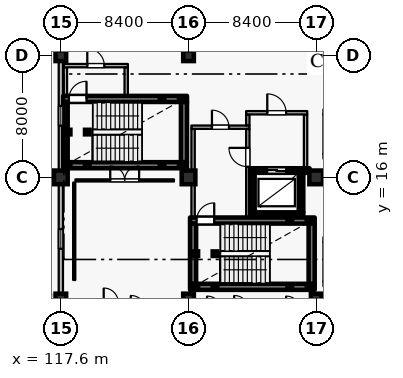
"""IFC4 building model, lengths in metres.
Left out: names, types, materials, properties, quantities, classifications, styles, units other than length and angle.
Written with IfcOpenShell. Run it as: python <this file> out.ifc"""

import sys

from ifc_helpers import new_model, si_unit, direction, frame, frame_2d, origin, origin_2d, place, context, subcontext, project, spatial, rectangle, hollow_rectangle, extrude, element, fill, save


model = new_model("IFC4")
c1 = context("Model", 3, precision=1e-05, world=origin(), true_north=direction((0.0, 1.0)))
c2 = subcontext(c1, "Body", "Model", "MODEL_VIEW")
j1 = project(units=[si_unit("LENGTHUNIT", "METRE"), si_unit("PLANEANGLEUNIT", "RADIAN")], contexts=[c1])
p1 = place(None, origin())
s1 = spatial("IfcSite", under=j1, at=p1, CompositionType="ELEMENT")
p2 = place(p1, origin())
s2 = spatial("IfcBuilding", under=s1, at=p2, CompositionType="ELEMENT")
p3 = place(p2, frame((0.0, 0.0, 21.0)))
s3 = spatial("IfcBuildingStorey", under=s2, at=p3, CompositionType="ELEMENT", Elevation=21.0)
for number, where, z_axis, x_axis in (
    (1, (117.6, 16.0, 0.0), (0.0, 0.0, 1.0), (1.0, 0.0, 0.0)),
    (2, (126.0, 16.0, 0.0), (0.0, 0.0, 1.0), (1.0, 0.0, 0.0)),
    (3, (134.4, 16.0, 0.0), (0.0, 0.0, 1.0), (1.0, 0.0, 0.0)),
):
    element("IfcColumn", number, at=place(p3, frame(where, z_axis=z_axis, x_axis=x_axis)), inside=s3, PredefinedType="COLUMN", context=c2, shape_type="SweptSolid", body=[
        extrude(rectangle(XDim=0.9, YDim=0.9, at=origin_2d()), origin(), (0.0, 0.0, 1.0), 4.2),
    ])
for number, where, z_axis, x_axis in (
    (4, (117.6, 8.0, 0.0), (0.0, 0.0, 1.0), (1.0, 0.0, 0.0)),
    (5, (117.6, 24.0, 0.0), (0.0, 0.0, 1.0), (1.0, 0.0, 0.0)),
    (6, (126.0, 8.0, 0.0), (0.0, 0.0, 1.0), (1.0, 0.0, 0.0)),
    (7, (126.0, 24.0, 0.0), (0.0, 0.0, 1.0), (1.0, 0.0, 0.0)),
    (8, (134.4, 8.0, 0.0), (0.0, 0.0, 1.0), (1.0, 0.0, 0.0)),
    (9, (134.4, 24.0, 0.0), (0.0, 0.0, 1.0), (1.0, 0.0, 0.0)),
):
    element("IfcColumn", number, at=place(p3, frame(where, z_axis=z_axis, x_axis=x_axis)), inside=s3, PredefinedType="COLUMN", context=c2, shape_type="SweptSolid", body=[
        extrude(rectangle(XDim=0.7, YDim=0.7, at=origin_2d()), origin(), (0.0, 0.0, 1.0), 4.2),
    ])
p4 = place(p3, frame((117.6, 8.35, 0.0), z_axis=(0.0, 0.0, 1.0), x_axis=(0.0, 1.0, 0.0)))
e10 = element("IfcWall", 10, at=p4, inside=s3, PredefinedType="SOLIDWALL", context=c2, shape_type="SweptSolid", body=[
    extrude(rectangle(XDim=7.2, YDim=0.28, at=frame_2d((3.6, 0.0))), origin(), (0.0, 0.0, 1.0), 3.3),
])
p5 = place(p4, frame((2.95, 0.0, 0.75)))
e11 = element("IfcOpeningElement", 11, at=p5, cuts=e10, PredefinedType="OPENING", context=c2, shape_type="SweptSolid", body=[
    extrude(rectangle(XDim=1.3, YDim=1.65, at=frame_2d((0.65, 0.825))), frame((0.0, 0.15, 0.0), z_axis=(0.0, -1.0, 0.0), x_axis=(1.0, 0.0, 0.0)), (0.0, 0.0, 1.0), 0.3),
])
p6 = place(p3, frame((117.6, 16.45, 0.0), z_axis=(0.0, 0.0, 1.0), x_axis=(0.0, 1.0, 0.0)))
e12 = element("IfcWall", 12, at=p6, inside=s3, PredefinedType="SOLIDWALL", context=c2, shape_type="SweptSolid", body=[
    extrude(rectangle(XDim=7.2, YDim=0.28, at=frame_2d((3.6, 0.0))), origin(), (0.0, 0.0, 1.0), 3.3),
])
p7 = place(p6, frame((2.95, 0.0, 0.75)))
e13 = element("IfcOpeningElement", 13, at=p7, cuts=e12, PredefinedType="OPENING", context=c2, shape_type="SweptSolid", body=[
    extrude(rectangle(XDim=1.3, YDim=1.65, at=frame_2d((0.65, 0.825))), frame((0.0, 0.15, 0.0), z_axis=(0.0, -1.0, 0.0), x_axis=(1.0, 0.0, 0.0)), (0.0, 0.0, 1.0), 0.3),
])
p8 = place(p3, frame((130.05, 13.55, 0.0), z_axis=(0.0, 0.0, 1.0), x_axis=(1.0, 0.0, 0.0)))
e14 = element("IfcWall", 14, at=p8, inside=s3, PredefinedType="SHEAR", context=c2, shape_type="SweptSolid", body=[
    extrude(rectangle(XDim=3.5, YDim=0.3, at=frame_2d((1.75, 0.0))), origin(), (0.0, 0.0, 1.0), 3.965),
])
p9 = place(p3, frame((133.4, 13.705, 0.0), z_axis=(0.0, 0.0, 1.0), x_axis=(0.0, 1.0, 0.0)))
e15 = element("IfcWall", 15, at=p9, inside=s3, PredefinedType="SHEAR", context=c2, shape_type="SweptSolid", body=[
    extrude(rectangle(XDim=2.59, YDim=0.3, at=frame_2d((1.295, 0.0))), origin(), (0.0, 0.0, 1.0), 3.965),
])
p10 = place(p3, frame((133.96, 16.45, 0.0), z_axis=(0.0, 0.0, 1.0), x_axis=(-1.0, 0.0, 0.0)))
e16 = element("IfcWall", 16, at=p10, inside=s3, PredefinedType="SHEAR", context=c2, shape_type="SweptSolid", body=[
    extrude(rectangle(XDim=3.91, YDim=0.3, at=frame_2d((1.955, 0.0))), origin(), (0.0, 0.0, 1.0), 3.965),
])
p11 = place(p10, frame((1.535, 0.0, 0.0)))
e17 = element("IfcOpeningElement", 17, at=p11, cuts=e16, PredefinedType="OPENING", context=c2, shape_type="SweptSolid", body=[
    extrude(rectangle(XDim=1.25, YDim=2.25, at=frame_2d((0.625, 1.125))), frame((0.0, 0.16, 0.0), z_axis=(0.0, -1.0, 0.0), x_axis=(1.0, 0.0, 0.0)), (0.0, 0.0, 1.0), 0.32),
])
p12 = place(p3, frame((130.2, 16.295, 0.0), z_axis=(0.0, 0.0, 1.0), x_axis=(0.0, -1.0, 0.0)))
e18 = element("IfcWall", 18, at=p12, inside=s3, PredefinedType="SHEAR", context=c2, shape_type="SweptSolid", body=[
    extrude(rectangle(XDim=2.59, YDim=0.3, at=frame_2d((1.295, 0.0))), origin(), (0.0, 0.0, 1.0), 3.965),
])
p13 = place(p3, frame((126.1, 8.8, 0.0), z_axis=(0.0, 0.0, 1.0), x_axis=(1.0, 0.0, 0.0)))
e19 = element("IfcWall", 19, at=p13, inside=s3, PredefinedType="SHEAR", context=c2, shape_type="SweptSolid", body=[
    extrude(rectangle(XDim=8.2, YDim=0.4, at=frame_2d((4.1, 0.0))), origin(), (0.0, 0.0, 1.0), 3.965),
])
p14 = place(p3, frame((134.1, 9.005, 0.0), z_axis=(0.0, 0.0, 1.0), x_axis=(0.0, 1.0, 0.0)))
e20 = element("IfcWall", 20, at=p14, inside=s3, PredefinedType="SHEAR", context=c2, shape_type="SweptSolid", body=[
    extrude(rectangle(XDim=3.95, YDim=0.4, at=frame_2d((1.975, 0.0))), origin(), (0.0, 0.0, 1.0), 3.965),
])
p15 = place(p3, frame((126.1, 13.16, 0.0), z_axis=(0.0, 0.0, 1.0), x_axis=(1.0, 0.0, 0.0)))
e21 = element("IfcWall", 21, at=p15, inside=s3, PredefinedType="SHEAR", context=c2, shape_type="SweptSolid", body=[
    extrude(rectangle(XDim=8.2, YDim=0.4, at=frame_2d((4.1, 0.0))), origin(), (0.0, 0.0, 1.0), 3.965),
])
p16 = place(p15, frame((0.43, 0.0, 0.0)))
e22 = element("IfcOpeningElement", 22, at=p16, cuts=e21, PredefinedType="OPENING", context=c2, shape_type="SweptSolid", body=[
    extrude(rectangle(XDim=1.16, YDim=2.2, at=frame_2d((0.58, 1.1))), frame((0.0, 0.21, 0.0), z_axis=(0.0, -1.0, 0.0), x_axis=(1.0, 0.0, 0.0)), (0.0, 0.0, 1.0), 0.42),
])
p17 = place(p3, frame((126.3, 9.005, 0.0), z_axis=(0.0, 0.0, 1.0), x_axis=(0.0, 1.0, 0.0)))
e23 = element("IfcWall", 23, at=p17, inside=s3, PredefinedType="SHEAR", context=c2, shape_type="SweptSolid", body=[
    extrude(rectangle(XDim=3.95, YDim=0.4, at=frame_2d((1.975, 0.0))), origin(), (0.0, 0.0, 1.0), 3.965),
])
p18 = place(p3, frame((126.3, 13.365, 0.0), z_axis=(0.0, 0.0, 1.0), x_axis=(0.0, 1.0, 0.0)))
e24 = element("IfcWall", 24, at=p18, inside=s3, PredefinedType="PARTITIONING", context=c2, shape_type="SweptSolid", body=[
    extrude(rectangle(XDim=5.82, YDim=0.22, at=frame_2d((2.91, 0.0))), origin(), (0.0, 0.0, 1.0), 3.965),
])
p19 = place(p3, frame((126.19, 19.3, 0.0), z_axis=(0.0, 0.0, 1.0), x_axis=(1.0, 0.0, 0.0)))
e25 = element("IfcWall", 25, at=p19, inside=s3, PredefinedType="PARTITIONING", context=c2, shape_type="SweptSolid", body=[
    extrude(rectangle(XDim=3.82, YDim=0.22, at=frame_2d((1.91, 0.0))), origin(), (0.0, 0.0, 1.0), 3.965),
])
p20 = place(p19, frame((1.35, 0.0, 0.0)))
e26 = element("IfcOpeningElement", 26, at=p20, cuts=e25, PredefinedType="OPENING", context=c2, shape_type="SweptSolid", body=[
    extrude(rectangle(XDim=1.12, YDim=2.2, at=frame_2d((0.56, 1.1))), frame((0.0, 0.12, 0.0), z_axis=(0.0, -1.0, 0.0), x_axis=(1.0, 0.0, 0.0)), (0.0, 0.0, 1.0), 0.24),
])
p21 = place(p3, frame((129.9, 13.365, 0.0), z_axis=(0.0, 0.0, 1.0), x_axis=(0.0, 1.0, 0.0)))
e27 = element("IfcWall", 27, at=p21, inside=s3, PredefinedType="PARTITIONING", context=c2, shape_type="SweptSolid", body=[
    extrude(rectangle(XDim=5.82, YDim=0.22, at=frame_2d((2.91, 0.0))), origin(), (0.0, 0.0, 1.0), 3.965),
])
p22 = place(p21, frame((3.335, 0.0, 0.0)))
e28 = element("IfcOpeningElement", 28, at=p22, cuts=e27, PredefinedType="OPENING", context=c2, shape_type="SweptSolid", body=[
    extrude(rectangle(XDim=1.24, YDim=2.2, at=frame_2d((0.62, 1.1))), frame((0.0, 0.12, 0.0), z_axis=(0.0, -1.0, 0.0), x_axis=(1.0, 0.0, 0.0)), (0.0, 0.0, 1.0), 0.24),
])
p23 = place(p3, frame((129.9, 19.415, 0.0), z_axis=(0.0, 0.0, 1.0), x_axis=(0.0, 1.0, 0.0)))
e29 = element("IfcWall", 29, at=p23, inside=s3, PredefinedType="PARTITIONING", context=c2, shape_type="SweptSolid", body=[
    extrude(rectangle(XDim=0.72, YDim=0.22, at=frame_2d((0.36, 0.0))), origin(), (0.0, 0.0, 1.0), 3.965),
])
p24 = place(p3, frame((133.7, 16.605, 0.0), z_axis=(0.0, 0.0, 1.0), x_axis=(0.0, 1.0, 0.0)))
e30 = element("IfcWall", 30, at=p24, inside=s3, PredefinedType="PARTITIONING", context=c2, shape_type="SweptSolid", body=[
    extrude(rectangle(XDim=3.53, YDim=0.22, at=frame_2d((1.765, 0.0))), origin(), (0.0, 0.0, 1.0), 3.965),
])
p25 = place(p3, frame((129.79, 20.25, 0.0), z_axis=(0.0, 0.0, 1.0), x_axis=(1.0, 0.0, 0.0)))
e31 = element("IfcWall", 31, at=p25, inside=s3, PredefinedType="PARTITIONING", context=c2, shape_type="SweptSolid", body=[
    extrude(rectangle(XDim=4.02, YDim=0.22, at=frame_2d((2.01, 0.0))), origin(), (0.0, 0.0, 1.0), 3.965),
])
p26 = place(p25, frame((1.39, 0.0, 0.0)))
e32 = element("IfcOpeningElement", 32, at=p26, cuts=e31, PredefinedType="OPENING", context=c2, shape_type="SweptSolid", body=[
    extrude(rectangle(XDim=1.24, YDim=2.2, at=frame_2d((0.62, 1.1))), frame((0.0, 0.12, 0.0), z_axis=(0.0, -1.0, 0.0), x_axis=(1.0, 0.0, 0.0)), (0.0, 0.0, 1.0), 0.24),
])
for number, where, z_axis, x_axis in (
    (33, (126.48, 8.8, 0.0), (0.0, 0.0, 1.0), (1.0, 0.0, 0.0)),
    (34, (126.48, 10.98, 0.0), (0.0, 0.0, 1.0), (1.0, 0.0, 0.0)),
    (35, (127.74, 8.8, 0.0), (0.0, 0.0, 1.0), (1.0, 0.0, 0.0)),
    (36, (127.74, 10.98, 0.0), (0.0, 0.0, 1.0), (1.0, 0.0, 0.0)),
):
    element("IfcColumn", number, at=place(p3, frame(where, z_axis=z_axis, x_axis=x_axis)), inside=s3, PredefinedType="COLUMN", context=c2, shape_type="SweptSolid", body=[
        extrude(hollow_rectangle(XDim=0.3, YDim=0.3, WallThickness=0.012, at=origin_2d()), origin(), (0.0, 0.0, 1.0), 4.02),
    ])
for number, where, z_axis, x_axis in (
    (37, (132.66, 8.8, -2.4), (0.0, 0.0, 1.0), (1.0, 0.0, 0.0)),
    (38, (132.66, 13.16, -2.4), (0.0, 0.0, 1.0), (1.0, 0.0, 0.0)),
    (39, (133.92, 8.8, -2.4), (0.0, 0.0, 1.0), (1.0, 0.0, 0.0)),
    (40, (133.92, 13.16, -2.4), (0.0, 0.0, 1.0), (1.0, 0.0, 0.0)),
):
    element("IfcColumn", number, at=place(p3, frame(where, z_axis=z_axis, x_axis=x_axis)), inside=s3, PredefinedType="COLUMN", context=c2, shape_type="SweptSolid", body=[
        extrude(hollow_rectangle(XDim=0.3, YDim=0.3, WallThickness=0.012, at=origin_2d()), origin(), (0.0, 0.0, 1.0), 4.32),
    ])
p27 = place(p3, frame((117.75, 16.8, 0.0), z_axis=(0.0, 0.0, 1.0), x_axis=(1.0, 0.0, 0.0)))
e41 = element("IfcWall", 41, at=p27, inside=s3, PredefinedType="SHEAR", context=c2, shape_type="SweptSolid", body=[
    extrude(rectangle(XDim=8.15, YDim=0.4, at=frame_2d((4.075, 0.0))), origin(), (0.0, 0.0, 1.0), 3.965),
])
p28 = place(p3, frame((125.7, 17.005, 0.0), z_axis=(0.0, 0.0, 1.0), x_axis=(0.0, 1.0, 0.0)))
e42 = element("IfcWall", 42, at=p28, inside=s3, PredefinedType="SHEAR", context=c2, shape_type="SweptSolid", body=[
    extrude(rectangle(XDim=3.95, YDim=0.4, at=frame_2d((1.975, 0.0))), origin(), (0.0, 0.0, 1.0), 3.965),
])
p29 = place(p3, frame((117.75, 21.16, 0.0), z_axis=(0.0, 0.0, 1.0), x_axis=(1.0, 0.0, 0.0)))
e43 = element("IfcWall", 43, at=p29, inside=s3, PredefinedType="SHEAR", context=c2, shape_type="SweptSolid", body=[
    extrude(rectangle(XDim=8.15, YDim=0.4, at=frame_2d((4.075, 0.0))), origin(), (0.0, 0.0, 1.0), 3.965),
])
p30 = place(p29, frame((0.38, 0.0, 0.0)))
e44 = element("IfcOpeningElement", 44, at=p30, cuts=e43, PredefinedType="OPENING", context=c2, shape_type="SweptSolid", body=[
    extrude(rectangle(XDim=1.16, YDim=2.2, at=frame_2d((0.58, 1.1))), frame((0.0, 0.21, 0.0), z_axis=(0.0, -1.0, 0.0), x_axis=(1.0, 0.0, 0.0)), (0.0, 0.0, 1.0), 0.42),
])
p31 = place(p3, frame((117.9, 17.005, 0.0), z_axis=(0.0, 0.0, 1.0), x_axis=(0.0, 1.0, 0.0)))
e45 = element("IfcWall", 45, at=p31, inside=s3, PredefinedType="SHEAR", context=c2, shape_type="SweptSolid", body=[
    extrude(rectangle(XDim=3.95, YDim=0.3, at=frame_2d((1.975, 0.0))), origin(), (0.0, 0.0, 1.0), 3.965),
])
p32 = place(p3, frame((117.9, 21.365, 0.0), z_axis=(0.0, 0.0, 1.0), x_axis=(0.0, 1.0, 0.0)))
e46 = element("IfcWall", 46, at=p32, inside=s3, PredefinedType="PARTITIONING", context=c2, shape_type="SweptSolid", body=[
    extrude(rectangle(XDim=1.87, YDim=0.22, at=frame_2d((0.935, 0.0))), origin(), (0.0, 0.0, 1.0), 3.965),
])
p33 = place(p3, frame((117.79, 23.35, 0.0), z_axis=(0.0, 0.0, 1.0), x_axis=(1.0, 0.0, 0.0)))
e47 = element("IfcWall", 47, at=p33, inside=s3, PredefinedType="PARTITIONING", context=c2, shape_type="SweptSolid", body=[
    extrude(rectangle(XDim=4.22, YDim=0.22, at=frame_2d((2.11, 0.0))), origin(), (0.0, 0.0, 1.0), 3.965),
])
p34 = place(p33, frame((1.55, 0.0, 0.0)))
e48 = element("IfcOpeningElement", 48, at=p34, cuts=e47, PredefinedType="OPENING", context=c2, shape_type="SweptSolid", body=[
    extrude(rectangle(XDim=1.12, YDim=2.2, at=frame_2d((0.56, 1.1))), frame((0.0, 0.12, 0.0), z_axis=(0.0, -1.0, 0.0), x_axis=(1.0, 0.0, 0.0)), (0.0, 0.0, 1.0), 0.24),
])
p35 = place(p3, frame((121.9, 21.365, 0.0), z_axis=(0.0, 0.0, 1.0), x_axis=(0.0, 1.0, 0.0)))
e49 = element("IfcWall", 49, at=p35, inside=s3, PredefinedType="PARTITIONING", context=c2, shape_type="SweptSolid", body=[
    extrude(rectangle(XDim=1.87, YDim=0.22, at=frame_2d((0.935, 0.0))), origin(), (0.0, 0.0, 1.0), 3.965),
])
for number, where, z_axis, x_axis in (
    (50, (118.08, 16.8, 0.0), (0.0, 0.0, 1.0), (1.0, 0.0, 0.0)),
    (51, (118.08, 18.98, 0.0), (0.0, 0.0, 1.0), (1.0, 0.0, 0.0)),
    (52, (119.34, 16.8, 0.0), (0.0, 0.0, 1.0), (1.0, 0.0, 0.0)),
    (53, (119.34, 18.98, 0.0), (0.0, 0.0, 1.0), (1.0, 0.0, 0.0)),
):
    element("IfcColumn", number, at=place(p3, frame(where, z_axis=z_axis, x_axis=x_axis)), inside=s3, PredefinedType="COLUMN", context=c2, shape_type="SweptSolid", body=[
        extrude(hollow_rectangle(XDim=0.3, YDim=0.3, WallThickness=0.012, at=origin_2d()), origin(), (0.0, 0.0, 1.0), 4.02),
    ])
for number, where, z_axis, x_axis in (
    (54, (124.26, 16.8, -2.4), (0.0, 0.0, 1.0), (1.0, 0.0, 0.0)),
    (55, (124.26, 21.16, -2.4), (0.0, 0.0, 1.0), (1.0, 0.0, 0.0)),
    (56, (125.52, 16.8, -2.4), (0.0, 0.0, 1.0), (1.0, 0.0, 0.0)),
    (57, (125.52, 21.16, -2.4), (0.0, 0.0, 1.0), (1.0, 0.0, 0.0)),
):
    element("IfcColumn", number, at=place(p3, frame(where, z_axis=z_axis, x_axis=x_axis)), inside=s3, PredefinedType="COLUMN", context=c2, shape_type="SweptSolid", body=[
        extrude(hollow_rectangle(XDim=0.3, YDim=0.3, WallThickness=0.012, at=origin_2d()), origin(), (0.0, 0.0, 1.0), 4.32),
    ])
p36 = place(p3, frame((118.56, 15.8, 0.0), z_axis=(0.0, 0.0, 1.0), x_axis=(1.0, 0.0, 0.0)))
e58 = element("IfcWall", 58, at=p36, inside=s3, PredefinedType="PARTITIONING", context=c2, shape_type="SweptSolid", body=[
    extrude(rectangle(XDim=6.48, YDim=0.14, at=frame_2d((3.24, 0.0))), origin(), (0.0, 0.0, 1.0), 3.965),
])
p37 = place(p36, frame((2.29, 0.0, 0.0)))
e59 = element("IfcOpeningElement", 59, at=p37, cuts=e58, PredefinedType="OPENING", context=c2, shape_type="SweptSolid", body=[
    extrude(rectangle(XDim=1.9, YDim=2.4, at=frame_2d((0.95, 1.2))), frame((0.0, 0.08, 0.0), z_axis=(0.0, -1.0, 0.0), x_axis=(1.0, 0.0, 0.0)), (0.0, 0.0, 1.0), 0.16),
])
p38 = place(p3, frame((118.48, 9.25, 0.0), z_axis=(0.0, 0.0, 1.0), x_axis=(0.0, 1.0, 0.0)))
e60 = element("IfcWall", 60, at=p38, inside=s3, PredefinedType="PARTITIONING", context=c2, shape_type="SweptSolid", body=[
    extrude(rectangle(XDim=6.41, YDim=0.14, at=frame_2d((3.205, 0.0))), origin(), (0.0, 0.0, 1.0), 3.965),
])
p39 = place(p5, origin())
e61 = element("IfcWindow", 61, at=p39, inside=s3, PartitioningType="SINGLE_PANEL", PredefinedType="WINDOW", context=c2, shape_type="SweptSolid", body=[
    extrude(rectangle(XDim=1.3, YDim=1.65, at=frame_2d((0.65, 0.825))), frame((0.0, 0.03, 0.0), z_axis=(0.0, -1.0, 0.0), x_axis=(1.0, 0.0, 0.0)), (0.0, 0.0, 1.0), 0.06),
])
fill(e11, e61)
p40 = place(p7, origin())
e62 = element("IfcWindow", 62, at=p40, inside=s3, PartitioningType="SINGLE_PANEL", PredefinedType="WINDOW", context=c2, shape_type="SweptSolid", body=[
    extrude(rectangle(XDim=1.3, YDim=1.65, at=frame_2d((0.65, 0.825))), frame((0.0, 0.03, 0.0), z_axis=(0.0, -1.0, 0.0), x_axis=(1.0, 0.0, 0.0)), (0.0, 0.0, 1.0), 0.06),
])
fill(e13, e62)
p41 = place(p11, origin())
e63 = element("IfcDoor", 63, at=p41, inside=s3, OperationType="DOUBLE_DOOR_SLIDING", PredefinedType="DOOR", context=c2, shape_type="SweptSolid", body=[
    extrude(rectangle(XDim=1.25, YDim=2.25, at=frame_2d((0.625, 1.125))), frame((0.0, 0.025, 0.0), z_axis=(0.0, -1.0, 0.0), x_axis=(1.0, 0.0, 0.0)), (0.0, 0.0, 1.0), 0.05),
])
fill(e17, e63)
p42 = place(p16, origin())
e64 = element("IfcDoor", 64, at=p42, inside=s3, OperationType="SINGLE_SWING_RIGHT", PredefinedType="DOOR", context=c2, shape_type="SweptSolid", body=[
    extrude(rectangle(XDim=1.16, YDim=2.2, at=frame_2d((0.58, 1.1))), frame((0.0, 0.025, 0.0), z_axis=(0.0, -1.0, 0.0), x_axis=(1.0, 0.0, 0.0)), (0.0, 0.0, 1.0), 0.05),
])
fill(e22, e64)
p43 = place(p20, origin())
e65 = element("IfcDoor", 65, at=p43, inside=s3, OperationType="SINGLE_SWING_LEFT", PredefinedType="DOOR", context=c2, shape_type="SweptSolid", body=[
    extrude(rectangle(XDim=1.12, YDim=2.2, at=frame_2d((0.56, 1.1))), frame((0.0, 0.025, 0.0), z_axis=(0.0, -1.0, 0.0), x_axis=(1.0, 0.0, 0.0)), (0.0, 0.0, 1.0), 0.05),
])
fill(e26, e65)
p44 = place(p22, origin())
e66 = element("IfcDoor", 66, at=p44, inside=s3, OperationType="SINGLE_SWING_RIGHT", PredefinedType="DOOR", context=c2, shape_type="SweptSolid", body=[
    extrude(rectangle(XDim=1.24, YDim=2.2, at=frame_2d((0.62, 1.1))), frame((0.0, 0.025, 0.0), z_axis=(0.0, -1.0, 0.0), x_axis=(1.0, 0.0, 0.0)), (0.0, 0.0, 1.0), 0.05),
])
fill(e28, e66)
p45 = place(p26, origin())
e67 = element("IfcDoor", 67, at=p45, inside=s3, OperationType="SINGLE_SWING_LEFT", PredefinedType="DOOR", context=c2, shape_type="SweptSolid", body=[
    extrude(rectangle(XDim=1.24, YDim=2.2, at=frame_2d((0.62, 1.1))), frame((0.0, 0.025, 0.0), z_axis=(0.0, -1.0, 0.0), x_axis=(1.0, 0.0, 0.0)), (0.0, 0.0, 1.0), 0.05),
])
fill(e32, e67)
p46 = place(p30, origin())
e68 = element("IfcDoor", 68, at=p46, inside=s3, OperationType="SINGLE_SWING_RIGHT", PredefinedType="DOOR", context=c2, shape_type="SweptSolid", body=[
    extrude(rectangle(XDim=1.16, YDim=2.2, at=frame_2d((0.58, 1.1))), frame((0.0, 0.025, 0.0), z_axis=(0.0, -1.0, 0.0), x_axis=(1.0, 0.0, 0.0)), (0.0, 0.0, 1.0), 0.05),
])
fill(e44, e68)
p47 = place(p34, origin())
e69 = element("IfcDoor", 69, at=p47, inside=s3, OperationType="SINGLE_SWING_LEFT", PredefinedType="DOOR", context=c2, shape_type="SweptSolid", body=[
    extrude(rectangle(XDim=1.12, YDim=2.2, at=frame_2d((0.56, 1.1))), frame((0.0, 0.025, 0.0), z_axis=(0.0, -1.0, 0.0), x_axis=(1.0, 0.0, 0.0)), (0.0, 0.0, 1.0), 0.05),
])
fill(e48, e69)
p48 = place(p37, origin())
e70 = element("IfcDoor", 70, at=p48, inside=s3, OperationType="DOUBLE_DOOR_SINGLE_SWING", PredefinedType="DOOR", context=c2, shape_type="SweptSolid", body=[
    extrude(rectangle(XDim=1.9, YDim=2.4, at=frame_2d((0.95, 1.2))), frame((0.0, 0.025, 0.0), z_axis=(0.0, -1.0, 0.0), x_axis=(1.0, 0.0, 0.0)), (0.0, 0.0, 1.0), 0.05),
])
fill(e59, e70)
save(model, sys.argv[1])
